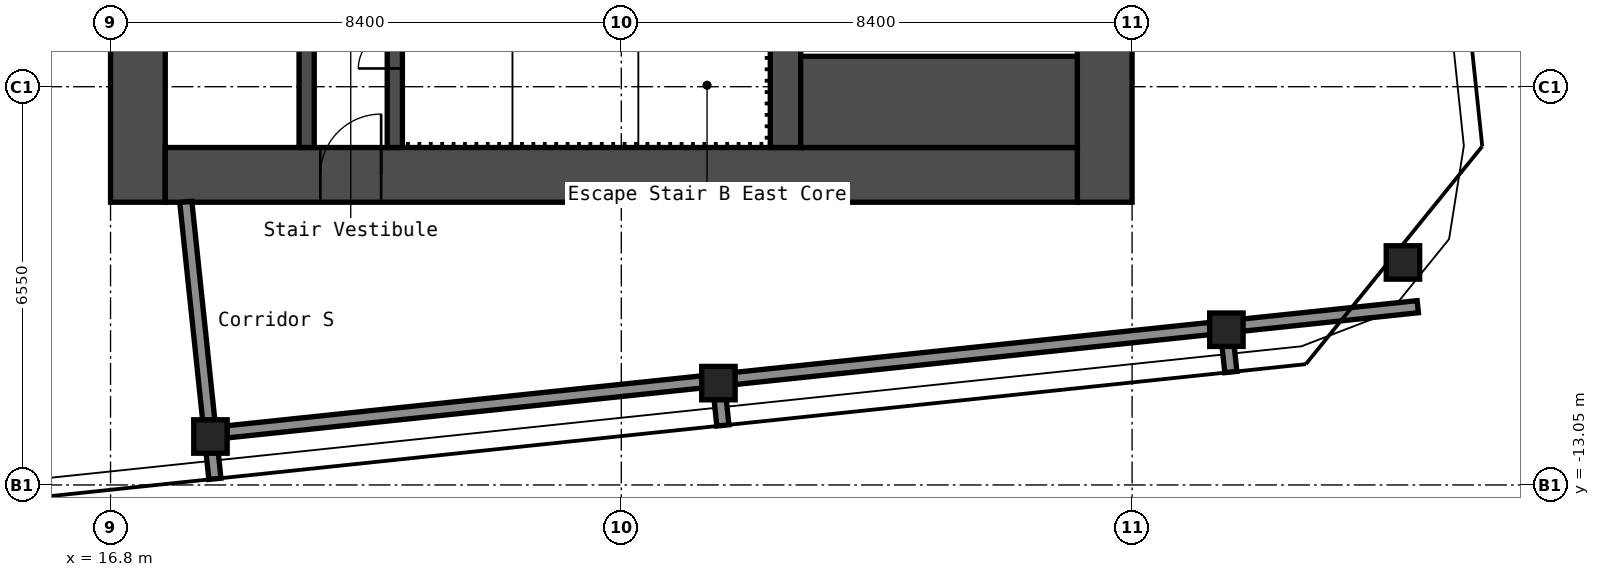
"""IFC4 building model, lengths in metres.
Left out: names, types, materials, properties, quantities, classifications, styles, units other than length and angle.
Written with IfcOpenShell. Run it as: python <this file> out.ifc"""

import sys

from ifc_helpers import new_model, si_unit, direction, frame, frame_2d, origin, origin_2d, place, context, subcontext, project, spatial, rectangle, hollow_rectangle, extrude, element, fill, save


model = new_model("IFC4")
c1 = context("Model", 3, precision=1e-05, world=origin(), true_north=direction((0.0, 1.0)))
c2 = subcontext(c1, "Body", "Model", "MODEL_VIEW")
j1 = project(units=[si_unit("LENGTHUNIT", "METRE"), si_unit("PLANEANGLEUNIT", "RADIAN")], contexts=[c1])
p1 = place(None, origin())
s1 = spatial("IfcSite", under=j1, at=p1, CompositionType="ELEMENT")
p2 = place(p1, origin())
s2 = spatial("IfcBuilding", under=s1, at=p2, CompositionType="ELEMENT")
p3 = place(p2, frame((0.0, 0.0, 255.0)))
s3 = spatial("IfcBuildingStorey", under=s2, at=p3, CompositionType="ELEMENT", Elevation=255.0)
for number, where, z_axis, x_axis in (
    (1, (18.443, -12.253, 0.0), (0.0, 0.0, 1.0), (1.0, 0.0, 0.0)),
    (2, (26.797, -11.375, 0.0), (0.0, 0.0, 1.0), (1.0, 0.0, 0.0)),
    (3, (35.151, -10.497, 0.0), (0.0, 0.0, 1.0), (1.0, 0.0, 0.0)),
    (4, (38.054, -9.39, 0.0), (0.0, 0.0, 1.0), (1.0, 0.0, 0.0)),
):
    element("IfcColumn", number, at=place(p3, frame(where, z_axis=z_axis, x_axis=x_axis)), inside=s3, PredefinedType="COLUMN", context=c2, shape_type="SweptSolid", body=[
        extrude(hollow_rectangle(XDim=0.55, YDim=0.55, WallThickness=0.022, InnerFilletRadius=0.033, OuterFilletRadius=0.055, at=origin_2d()), origin(), (0.0, 0.0, 1.0), 2.75),
    ])
p4 = place(p3, frame((17.25, -8.4, 0.0), z_axis=(0.0, 0.0, 1.0), x_axis=(0.0, 1.0, 0.0)))
e5 = element("IfcWall", 5, at=p4, inside=s3, PredefinedType="SHEAR", context=c2, shape_type="SweptSolid", body=[
    extrude(rectangle(XDim=16.8, YDim=0.9, at=frame_2d((8.4, 0.0))), origin(), (0.0, 0.0, 1.0), 2.75),
])
p5 = place(p4, frame((11.879, 0.0, 0.0)))
e6 = element("IfcOpeningElement", 6, at=p5, cuts=e5, PredefinedType="OPENING", context=c2, shape_type="SweptSolid", body=[
    extrude(rectangle(XDim=1.6, YDim=2.1, at=frame_2d((0.8, 1.05))), frame((0.0, 0.46, 0.0), z_axis=(0.0, -1.0, 0.0), x_axis=(1.0, 0.0, 0.0)), (0.0, 0.0, 1.0), 0.92),
])
p6 = place(p3, frame((33.15, -8.4, 0.0), z_axis=(0.0, 0.0, 1.0), x_axis=(0.0, 1.0, 0.0)))
e7 = element("IfcWall", 7, at=p6, inside=s3, PredefinedType="SHEAR", context=c2, shape_type="SweptSolid", body=[
    extrude(rectangle(XDim=16.8, YDim=0.9, at=frame_2d((8.4, 0.0))), origin(), (0.0, 0.0, 1.0), 2.75),
])
p7 = place(p3, frame((17.7, -7.95, 0.0), z_axis=(0.0, 0.0, 1.0), x_axis=(1.0, 0.0, 0.0)))
e8 = element("IfcWall", 8, at=p7, inside=s3, PredefinedType="SHEAR", context=c2, shape_type="SweptSolid", body=[
    extrude(rectangle(XDim=15.0, YDim=0.9, at=frame_2d((7.5, 0.0))), origin(), (0.0, 0.0, 1.0), 2.75),
])
p8 = place(p7, frame((2.55, 0.0, 0.0)))
e9 = element("IfcOpeningElement", 9, at=p8, cuts=e8, PredefinedType="OPENING", context=c2, shape_type="SweptSolid", body=[
    extrude(rectangle(XDim=1.0, YDim=2.1, at=frame_2d((0.5, 1.05))), frame((0.0, 0.46, 0.0), z_axis=(0.0, -1.0, 0.0), x_axis=(1.0, 0.0, 0.0)), (0.0, 0.0, 1.0), 0.92),
])
p9 = place(p3, frame((20.025, -7.5, 0.0), z_axis=(0.0, 0.0, 1.0), x_axis=(0.0, 1.0, 0.0)))
e10 = element("IfcWall", 10, at=p9, inside=s3, PredefinedType="SHEAR", context=c2, shape_type="SweptSolid", body=[
    extrude(rectangle(XDim=6.3, YDim=0.25, at=frame_2d((3.15, 0.0))), origin(), (0.0, 0.0, 1.0), 2.75),
])
p10 = place(p9, frame((2.4, 0.0, 0.0)))
e11 = element("IfcOpeningElement", 11, at=p10, cuts=e10, PredefinedType="OPENING", context=c2, shape_type="SweptSolid", body=[
    extrude(rectangle(XDim=1.0, YDim=2.1, at=frame_2d((0.5, 1.05))), frame((0.0, 0.135, 0.0), z_axis=(0.0, -1.0, 0.0), x_axis=(1.0, 0.0, 0.0)), (0.0, 0.0, 1.0), 0.27),
])
p11 = place(p3, frame((21.475, -7.5, 0.0), z_axis=(0.0, 0.0, 1.0), x_axis=(0.0, 1.0, 0.0)))
e12 = element("IfcWall", 12, at=p11, inside=s3, PredefinedType="SHEAR", context=c2, shape_type="SweptSolid", body=[
    extrude(rectangle(XDim=3.75, YDim=0.25, at=frame_2d((1.875, 0.0))), origin(), (0.0, 0.0, 1.0), 2.75),
])
p12 = place(p11, frame((1.3, 0.0, 0.0)))
e13 = element("IfcOpeningElement", 13, at=p12, cuts=e12, PredefinedType="OPENING", context=c2, shape_type="SweptSolid", body=[
    extrude(rectangle(XDim=1.2, YDim=2.1, at=frame_2d((0.6, 1.05))), frame((0.0, 0.135, 0.0), z_axis=(0.0, -1.0, 0.0), x_axis=(1.0, 0.0, 0.0)), (0.0, 0.0, 1.0), 0.27),
])
p13 = place(p3, frame((27.9, -7.5, 0.0), z_axis=(0.0, 0.0, 1.0), x_axis=(0.0, 1.0, 0.0)))
e14 = element("IfcWall", 14, at=p13, inside=s3, PredefinedType="SHEAR", context=c2, shape_type="SweptSolid", body=[
    extrude(rectangle(XDim=3.75, YDim=0.5, at=frame_2d((1.875, 0.0))), origin(), (0.0, 0.0, 1.0), 2.75),
])
p14 = place(p3, frame((28.15, -6.75, 0.0), z_axis=(0.0, 0.0, 1.0), x_axis=(1.0, 0.0, 0.0)))
e15 = element("IfcWall", 15, at=p14, inside=s3, PredefinedType="SHEAR", context=c2, shape_type="SweptSolid", body=[
    extrude(rectangle(XDim=4.55, YDim=1.5, at=frame_2d((2.275, 0.0))), origin(), (0.0, 0.0, 1.0), 2.75),
])
p15 = place(p3, frame((18.708, -12.177, 0.0), z_axis=(0.0, 0.0, 1.0), x_axis=(0.994521604238, 0.104531233147, 0.0)))
e16 = element("IfcWall", 16, at=p15, inside=s3, PredefinedType="PARTITIONING", context=c2, shape_type="SweptSolid", body=[
    extrude(rectangle(XDim=19.698, YDim=0.2, at=frame_2d((9.849, 0.0))), origin(), (0.0, 0.0, 1.0), 2.75),
])
p16 = place(p3, frame((18.516, -12.949, 0.0), z_axis=(0.0, 0.0, 1.0), x_axis=(-0.104548796268, 0.994519758074, 0.0)))
e17 = element("IfcWall", 17, at=p16, inside=s3, PredefinedType="PARTITIONING", context=c2, shape_type="SweptSolid", body=[
    extrude(rectangle(XDim=4.579, YDim=0.2, at=frame_2d((2.29, 0.0))), origin(), (0.0, 0.0, 1.0), 2.75),
])
for number, where, z_axis, x_axis in (
    (18, (26.87, -12.071, 0.0), (0.0, 0.0, 1.0), (-0.105, 0.994, 0.0)),
    (19, (35.224, -11.193, 0.0), (0.0, 0.0, 1.0), (-0.105, 0.994, 0.0)),
):
    element("IfcWall", number, at=place(p3, frame(where, z_axis=z_axis, x_axis=x_axis)), inside=s3, PredefinedType="PARTITIONING", context=c2, shape_type="SweptSolid", body=[
        extrude(rectangle(XDim=0.434, YDim=0.2, at=frame_2d((0.217, 0.0))), origin(), (0.0, 0.0, 1.0), 2.75),
    ])
p17 = place(p8, origin())
e20 = element("IfcDoor", 20, at=p17, inside=s3, OperationType="SINGLE_SWING_LEFT", PredefinedType="DOOR", context=c2, shape_type="SweptSolid", body=[
    extrude(rectangle(XDim=1.0, YDim=2.1, at=frame_2d((0.5, 1.05))), frame((0.0, 0.025, 0.0), z_axis=(0.0, -1.0, 0.0), x_axis=(1.0, 0.0, 0.0)), (0.0, 0.0, 1.0), 0.05),
])
fill(e9, e20)
p18 = place(p12, origin())
e21 = element("IfcDoor", 21, at=p18, inside=s3, OperationType="DOUBLE_DOOR_SINGLE_SWING", PredefinedType="DOOR", context=c2, shape_type="SweptSolid", body=[
    extrude(rectangle(XDim=1.2, YDim=2.1, at=frame_2d((0.6, 1.05))), frame((0.0, 0.025, 0.0), z_axis=(0.0, -1.0, 0.0), x_axis=(1.0, 0.0, 0.0)), (0.0, 0.0, 1.0), 0.05),
])
fill(e13, e21)
save(model, sys.argv[1])
